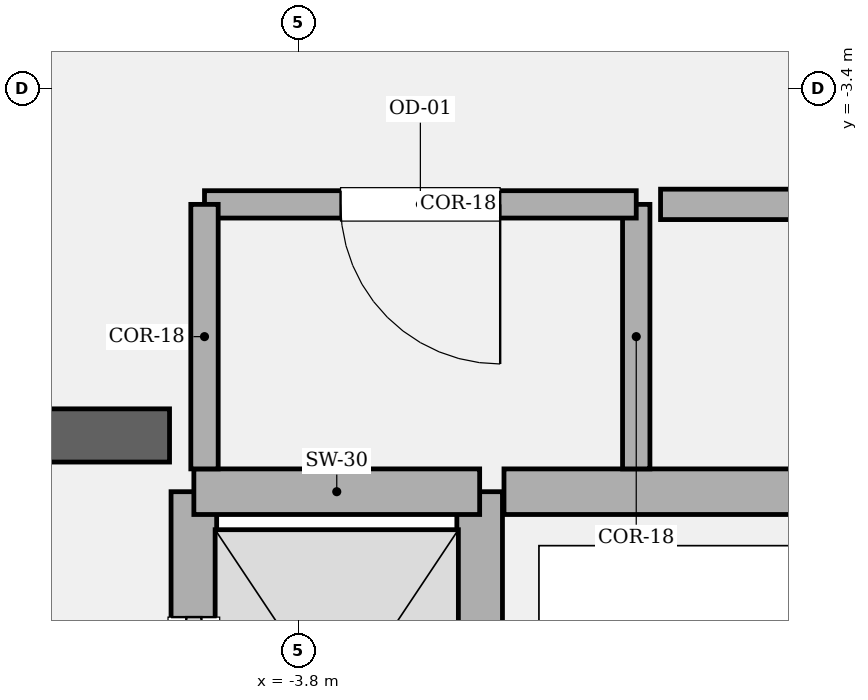
"""IFC4 building model, lengths in metres.
Left out: names, types, materials, properties, quantities, classifications, styles, units other than length and angle.
Written with IfcOpenShell. Run it as: python <this file> out.ifc"""

import sys

from ifc_helpers import new_model, si_unit, direction, frame, frame_2d, origin, place, context, subcontext, project, spatial, rectangle, extrude, element, fill, save


model = new_model("IFC4")
c1 = context("Model", 3, precision=1e-05, world=origin(), true_north=direction((0.0, 1.0)))
c2 = subcontext(c1, "Body", "Model", "MODEL_VIEW")
j1 = project(units=[si_unit("LENGTHUNIT", "METRE"), si_unit("PLANEANGLEUNIT", "RADIAN")], contexts=[c1])
p1 = place(None, origin())
s1 = spatial("IfcSite", under=j1, at=p1, CompositionType="ELEMENT")
p2 = place(p1, origin())
s2 = spatial("IfcBuilding", under=s1, at=p2, CompositionType="ELEMENT")
p3 = place(p2, frame((0.0, 0.0, 283.8)))
s3 = spatial("IfcBuildingStorey", under=s2, at=p3, CompositionType="ELEMENT", Elevation=283.8)
p4 = place(p3, frame((-9.925, -5.68, 0.0), z_axis=(0.0, 0.0, 1.0), x_axis=(1.0, 0.0, 0.0)))
e1 = element("IfcWall", 1, at=p4, inside=s3, PredefinedType="SOLIDWALL", context=c2, shape_type="SweptSolid", body=[
    extrude(rectangle(XDim=5.275, YDim=0.35, at=frame_2d((2.638, 0.0))), origin(), (0.0, 0.0, 1.0), 4.2),
])
p5 = place(p4, frame((1.385, 0.0, 0.0)))
e2 = element("IfcOpeningElement", 2, at=p5, cuts=e1, PredefinedType="OPENING", context=c2, shape_type="SweptSolid", body=[
    extrude(rectangle(XDim=1.18, YDim=2.2, at=frame_2d((0.59, 1.1))), frame((0.0, 0.185, 0.0), z_axis=(0.0, -1.0, 0.0), x_axis=(1.0, 0.0, 0.0)), (0.0, 0.0, 1.0), 0.37),
])
p6 = place(p3, frame((-4.49, -8.82, 0.0), z_axis=(0.0, 0.0, 1.0), x_axis=(0.0, 1.0, 0.0)))
e3 = element("IfcWall", 3, at=p6, inside=s3, PredefinedType="SOLIDWALL", context=c2, shape_type="SweptSolid", body=[
    extrude(rectangle(XDim=2.77, YDim=0.3, at=frame_2d((1.385, 0.0))), origin(), (0.0, 0.0, 1.0), 4.0),
])
p7 = place(p6, frame((0.825, 0.0, 0.0)))
e4 = element("IfcOpeningElement", 4, at=p7, cuts=e3, PredefinedType="OPENING", context=c2, shape_type="SweptSolid", body=[
    extrude(rectangle(XDim=1.12, YDim=2.25, at=frame_2d((0.56, 1.125))), frame((0.0, 0.16, 0.0), z_axis=(0.0, -1.0, 0.0), x_axis=(1.0, 0.0, 0.0)), (0.0, 0.0, 1.0), 0.32),
])
p8 = place(p3, frame((-2.61, -8.82, 0.0), z_axis=(0.0, 0.0, 1.0), x_axis=(0.0, 1.0, 0.0)))
e5 = element("IfcWall", 5, at=p8, inside=s3, PredefinedType="SOLIDWALL", context=c2, shape_type="SweptSolid", body=[
    extrude(rectangle(XDim=2.77, YDim=0.3, at=frame_2d((1.385, 0.0))), origin(), (0.0, 0.0, 1.0), 4.0),
])
p9 = place(p3, frame((-4.49, -6.05, 0.0), z_axis=(0.0, 0.0, 1.0), x_axis=(1.0, 0.0, 0.0)))
e6 = element("IfcWall", 6, at=p9, inside=s3, PredefinedType="SOLIDWALL", context=c2, shape_type="SweptSolid", body=[
    extrude(rectangle(XDim=1.88, YDim=0.3, at=frame_2d((0.94, 0.0))), origin(), (0.0, 0.0, 1.0), 4.0),
])
p10 = place(p3, frame((-2.45, -6.05, 0.0), z_axis=(0.0, 0.0, 1.0), x_axis=(1.0, 0.0, 0.0)))
e7 = element("IfcWall", 7, at=p10, inside=s3, PredefinedType="SOLIDWALL", context=c2, shape_type="SweptSolid", body=[
    extrude(rectangle(XDim=4.9, YDim=0.3, at=frame_2d((2.45, 0.0))), origin(), (0.0, 0.0, 1.0), 4.0),
])
p11 = place(p3, frame((-1.58, -5.9, 0.0), z_axis=(0.0, 0.0, 1.0), x_axis=(0.0, 1.0, 0.0)))
e8 = element("IfcWall", 8, at=p11, inside=s3, PredefinedType="PARTITIONING", context=c2, shape_type="SweptSolid", body=[
    extrude(rectangle(XDim=1.74, YDim=0.18, at=frame_2d((0.87, 0.0))), origin(), (0.0, 0.0, 1.0), 4.0),
])
p12 = place(p3, frame((-1.58, -4.16, 0.0), z_axis=(0.0, 0.0, 1.0), x_axis=(-1.0, 0.0, 0.0)))
e9 = element("IfcWall", 9, at=p12, inside=s3, PredefinedType="PARTITIONING", context=c2, shape_type="SweptSolid", body=[
    extrude(rectangle(XDim=2.84, YDim=0.18, at=frame_2d((1.42, 0.0))), origin(), (0.0, 0.0, 1.0), 4.0),
])
p13 = place(p12, frame((0.895, 0.0, 0.0)))
e10 = element("IfcOpeningElement", 10, at=p13, cuts=e9, PredefinedType="OPENING", context=c2, shape_type="SweptSolid", body=[
    extrude(rectangle(XDim=1.05, YDim=2.2, at=frame_2d((0.525, 1.1))), frame((0.0, 0.1, 0.0), z_axis=(0.0, -1.0, 0.0), x_axis=(1.0, 0.0, 0.0)), (0.0, 0.0, 1.0), 0.2),
])
p14 = place(p3, frame((-4.42, -4.16, 0.0), z_axis=(0.0, 0.0, 1.0), x_axis=(0.0, -1.0, 0.0)))
e11 = element("IfcWall", 11, at=p14, inside=s3, PredefinedType="PARTITIONING", context=c2, shape_type="SweptSolid", body=[
    extrude(rectangle(XDim=1.74, YDim=0.18, at=frame_2d((0.87, 0.0))), origin(), (0.0, 0.0, 1.0), 4.0),
])
p15 = place(p3, frame((1.42, -4.16, 0.0), z_axis=(0.0, 0.0, 1.0), x_axis=(-1.0, 0.0, 0.0)))
e12 = element("IfcWall", 12, at=p15, inside=s3, PredefinedType="SOLIDWALL", context=c2, shape_type="SweptSolid", body=[
    extrude(rectangle(XDim=2.84, YDim=0.2, at=frame_2d((1.42, 0.0))), origin(), (0.0, 0.0, 1.0), 4.0),
])
p16 = place(p15, frame((0.92, 0.0, 0.0)))
e13 = element("IfcOpeningElement", 13, at=p16, cuts=e12, PredefinedType="OPENING", context=c2, shape_type="SweptSolid", body=[
    extrude(rectangle(XDim=1.0, YDim=2.15, at=frame_2d((0.5, 1.075))), frame((0.0, 0.11, 0.0), z_axis=(0.0, -1.0, 0.0), x_axis=(1.0, 0.0, 0.0)), (0.0, 0.0, 1.0), 0.22),
])
p17 = place(p7, origin())
e14 = element("IfcDoor", 14, at=p17, inside=s3, OperationType="SLIDING_TO_LEFT", PredefinedType="DOOR", context=c2, shape_type="SweptSolid", body=[
    extrude(rectangle(XDim=1.12, YDim=2.25, at=frame_2d((0.56, 1.125))), frame((0.0, 0.025, 0.0), z_axis=(0.0, -1.0, 0.0), x_axis=(1.0, 0.0, 0.0)), (0.0, 0.0, 1.0), 0.05),
])
fill(e4, e14)
p18 = place(p13, origin())
e15 = element("IfcDoor", 15, at=p18, inside=s3, OperationType="SINGLE_SWING_LEFT", PredefinedType="DOOR", context=c2, shape_type="SweptSolid", body=[
    extrude(rectangle(XDim=1.05, YDim=2.2, at=frame_2d((0.525, 1.1))), frame((0.0, 0.025, 0.0), z_axis=(0.0, -1.0, 0.0), x_axis=(1.0, 0.0, 0.0)), (0.0, 0.0, 1.0), 0.05),
])
fill(e10, e15)
save(model, sys.argv[1])
